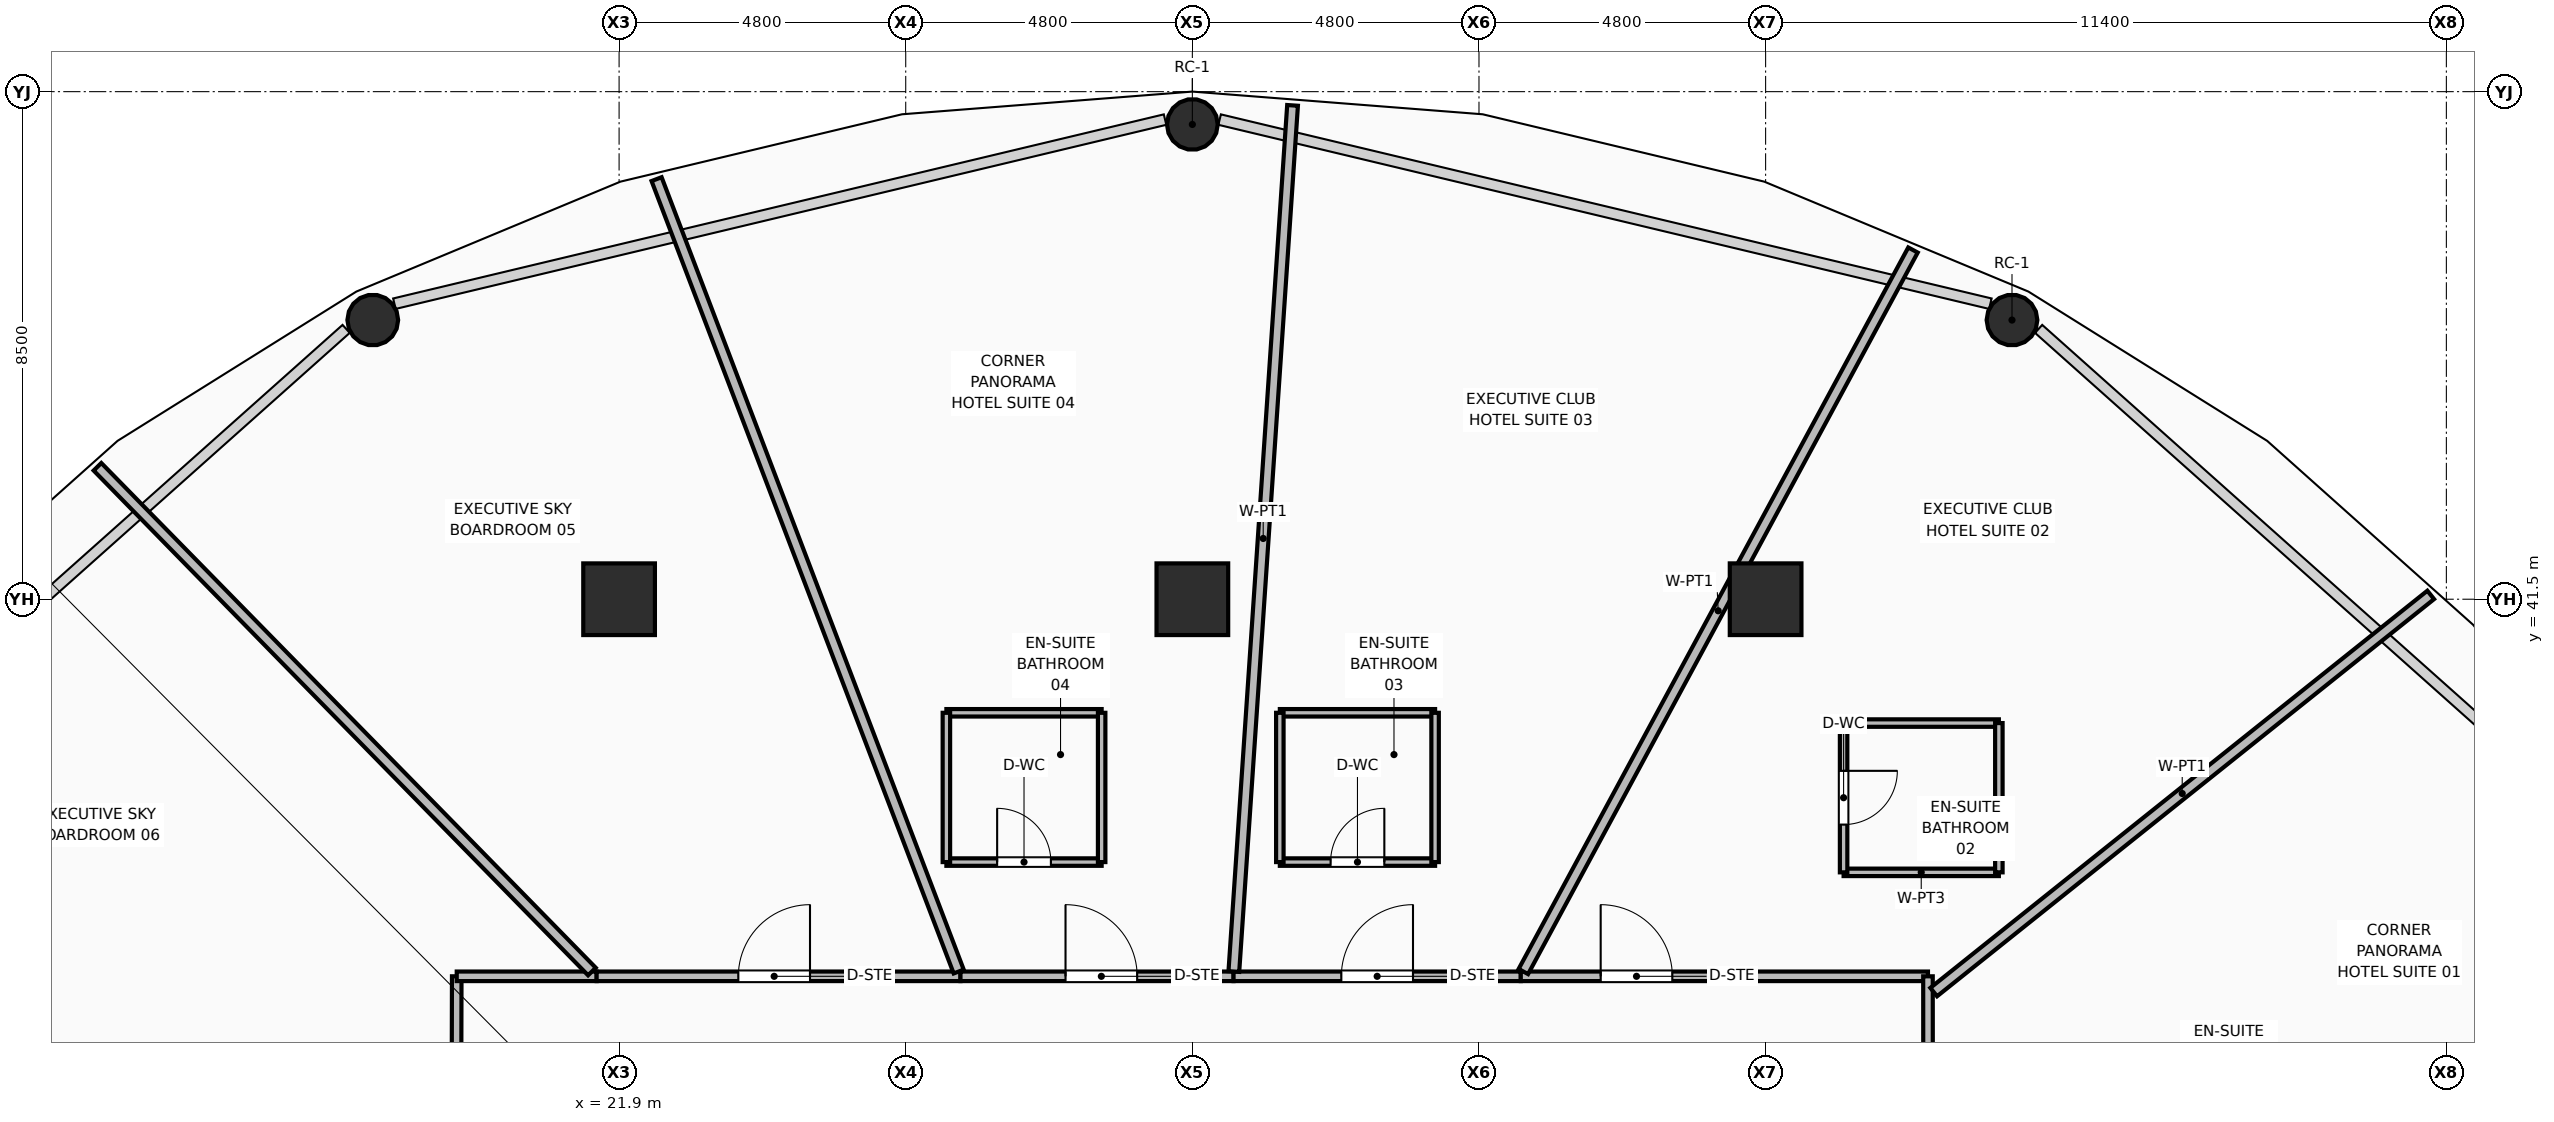
"""IFC4 building model, lengths in metres.
Left out: names, types, materials, properties, quantities, classifications, styles, units other than length and angle.
Written with IfcOpenShell. Run it as: python <this file> out.ifc"""

import sys

from ifc_helpers import new_model, si_unit, direction, frame, frame_2d, origin, origin_2d, place, context, subcontext, project, spatial, rectangle, hollow_rectangle, hollow_circle, extrude, element, fill, save


model = new_model("IFC4")
c1 = context("Model", 3, precision=1e-05, world=origin(), true_north=direction((0.0, 1.0)))
c2 = subcontext(c1, "Body", "Model", "MODEL_VIEW")
j1 = project(units=[si_unit("LENGTHUNIT", "METRE"), si_unit("PLANEANGLEUNIT", "RADIAN")], contexts=[c1])
p1 = place(None, origin())
s1 = spatial("IfcSite", under=j1, at=p1, CompositionType="ELEMENT")
p2 = place(p1, origin())
s2 = spatial("IfcBuilding", under=s1, at=p2, CompositionType="ELEMENT")
p3 = place(p2, frame((0.0, 0.0, 60.75)))
s3 = spatial("IfcBuildingStorey", under=s2, at=p3, CompositionType="ELEMENT", Elevation=60.75)
for number, where, z_axis, x_axis in (
    (1, (21.9, 41.5, 0.0), (0.0, 0.0, 1.0), (1.0, 0.0, 0.0)),
    (2, (31.5, 41.5, 0.0), (0.0, 0.0, 1.0), (1.0, 0.0, 0.0)),
    (3, (41.1, 41.5, 0.0), (0.0, 0.0, 1.0), (1.0, 0.0, 0.0)),
):
    element("IfcColumn", number, at=place(p3, frame(where, z_axis=z_axis, x_axis=x_axis)), inside=s3, PredefinedType="COLUMN", context=c2, shape_type="SweptSolid", body=[
        extrude(hollow_rectangle(XDim=1.2, YDim=1.2, WallThickness=0.045, at=origin_2d()), origin(), (0.0, 0.0, 1.0), 3.75),
    ])
for number, where, z_axis, x_axis in (
    (4, (45.226, 46.175, 0.0), (0.0, 0.0, 1.0), (1.0, 0.0, 0.0)),
    (5, (31.5, 49.451, 0.0), (0.0, 0.0, 1.0), (1.0, 0.0, 0.0)),
    (6, (17.775, 46.175, 0.0), (0.0, 0.0, 1.0), (1.0, 0.0, 0.0)),
):
    element("IfcColumn", number, at=place(p3, frame(where, z_axis=z_axis, x_axis=x_axis)), inside=s3, PredefinedType="COLUMN", context=c2, shape_type="SweptSolid", body=[
        extrude(hollow_circle(Radius=0.425, WallThickness=0.04, at=origin_2d()), origin(), (0.0, 0.0, 1.0), 3.57),
    ])
p4 = place(p3, frame((19.17, 30.432, 0.0), z_axis=(0.0, 0.0, 1.0), x_axis=(0.002311360614, 0.999997328802, 0.0)))
e7 = element("IfcWall", 7, at=p4, inside=s3, PredefinedType="PARTITIONING", context=c2, shape_type="SweptSolid", body=[
    extrude(rectangle(XDim=4.753, YDim=0.16, at=frame_2d((2.376, 0.0))), origin(), (0.0, 0.0, 1.0), 2.928),
])
p5 = place(p4, frame((0.601, 0.0, 0.0)))
e8 = element("IfcOpeningElement", 8, at=p5, cuts=e7, PredefinedType="OPENING", context=c2, shape_type="SweptSolid", body=[
    extrude(rectangle(XDim=1.2, YDim=2.1, at=frame_2d((0.6, 1.05))), frame((0.0, 0.09, 0.0), z_axis=(0.0, -1.0, 0.0), x_axis=(1.0, 0.0, 0.0)), (0.0, 0.0, 1.0), 0.18),
])
p6 = place(p3, frame((19.181, 35.185, 0.0), z_axis=(0.0, 0.0, 1.0), x_axis=(1.0, 0.0, 0.0)))
e9 = element("IfcWall", 9, at=p6, inside=s3, PredefinedType="PARTITIONING", context=c2, shape_type="SweptSolid", body=[
    extrude(rectangle(XDim=2.343, YDim=0.16, at=frame_2d((1.171, 0.0))), origin(), (0.0, 0.0, 1.0), 2.928),
])
p7 = place(p3, frame((21.524, 35.185, 0.0), z_axis=(0.0, 0.0, 1.0), x_axis=(1.0, 0.0, 0.0)))
e10 = element("IfcWall", 10, at=p7, inside=s3, PredefinedType="PARTITIONING", context=c2, shape_type="SweptSolid", body=[
    extrude(rectangle(XDim=6.093, YDim=0.16, at=frame_2d((3.046, 0.0))), origin(), (0.0, 0.0, 1.0), 3.55),
])
p8 = place(p7, frame((2.373, 0.0, 0.0)))
e11 = element("IfcOpeningElement", 11, at=p8, cuts=e10, PredefinedType="OPENING", context=c2, shape_type="SweptSolid", body=[
    extrude(rectangle(XDim=1.2, YDim=2.1, at=frame_2d((0.6, 1.05))), frame((0.0, 0.09, 0.0), z_axis=(0.0, -1.0, 0.0), x_axis=(1.0, 0.0, 0.0)), (0.0, 0.0, 1.0), 0.18),
])
p9 = place(p3, frame((27.617, 35.185, 0.0), z_axis=(0.0, 0.0, 1.0), x_axis=(1.0, 0.0, 0.0)))
e12 = element("IfcWall", 12, at=p9, inside=s3, PredefinedType="PARTITIONING", context=c2, shape_type="SweptSolid", body=[
    extrude(rectangle(XDim=4.573, YDim=0.16, at=frame_2d((2.287, 0.0))), origin(), (0.0, 0.0, 1.0), 2.928),
])
p10 = place(p9, frame((1.759, 0.0, 0.0)))
e13 = element("IfcOpeningElement", 13, at=p10, cuts=e12, PredefinedType="OPENING", context=c2, shape_type="SweptSolid", body=[
    extrude(rectangle(XDim=1.2, YDim=2.1, at=frame_2d((0.6, 1.05))), frame((0.0, 0.09, 0.0), z_axis=(0.0, -1.0, 0.0), x_axis=(1.0, 0.0, 0.0)), (0.0, 0.0, 1.0), 0.18),
])
p11 = place(p3, frame((32.19, 35.185, 0.0), z_axis=(0.0, 0.0, 1.0), x_axis=(1.0, 0.0, 0.0)))
e14 = element("IfcWall", 14, at=p11, inside=s3, PredefinedType="PARTITIONING", context=c2, shape_type="SweptSolid", body=[
    extrude(rectangle(XDim=4.81, YDim=0.16, at=frame_2d((2.405, 0.0))), origin(), (0.0, 0.0, 1.0), 3.55),
])
p12 = place(p11, frame((1.805, 0.0, 0.0)))
e15 = element("IfcOpeningElement", 15, at=p12, cuts=e14, PredefinedType="OPENING", context=c2, shape_type="SweptSolid", body=[
    extrude(rectangle(XDim=1.2, YDim=2.1, at=frame_2d((0.6, 1.05))), frame((0.0, 0.09, 0.0), z_axis=(0.0, -1.0, 0.0), x_axis=(1.0, 0.0, 0.0)), (0.0, 0.0, 1.0), 0.18),
])
p13 = place(p3, frame((37.0, 35.185, 0.0), z_axis=(0.0, 0.0, 1.0), x_axis=(1.0, 0.0, 0.0)))
e16 = element("IfcWall", 16, at=p13, inside=s3, PredefinedType="PARTITIONING", context=c2, shape_type="SweptSolid", body=[
    extrude(rectangle(XDim=6.819, YDim=0.16, at=frame_2d((3.41, 0.0))), origin(), (0.0, 0.0, 1.0), 2.928),
])
p14 = place(p13, frame((1.338, 0.0, 0.0)))
e17 = element("IfcOpeningElement", 17, at=p14, cuts=e16, PredefinedType="OPENING", context=c2, shape_type="SweptSolid", body=[
    extrude(rectangle(XDim=1.2, YDim=2.1, at=frame_2d((0.6, 1.05))), frame((0.0, 0.09, 0.0), z_axis=(0.0, -1.0, 0.0), x_axis=(1.0, 0.0, 0.0)), (0.0, 0.0, 1.0), 0.18),
])
p15 = place(p3, frame((43.819, 35.185, 0.0), z_axis=(0.0, 0.0, 1.0), x_axis=(0.000614958758, -0.999999810913, 0.0)))
e18 = element("IfcWall", 18, at=p15, inside=s3, PredefinedType="PARTITIONING", context=c2, shape_type="SweptSolid", body=[
    extrude(rectangle(XDim=6.352, YDim=0.16, at=frame_2d((3.176, 0.0))), origin(), (0.0, 0.0, 1.0), 2.928),
])
p16 = place(p15, frame((4.553, 0.0, 0.0)))
e19 = element("IfcOpeningElement", 19, at=p16, cuts=e18, PredefinedType="OPENING", context=c2, shape_type="SweptSolid", body=[
    extrude(rectangle(XDim=1.2, YDim=2.1, at=frame_2d((0.6, 1.05))), frame((0.0, 0.09, 0.0), z_axis=(0.0, -1.0, 0.0), x_axis=(1.0, 0.0, 0.0)), (0.0, 0.0, 1.0), 0.18),
])
p17 = place(p3, frame((43.915, 34.921, 0.0), z_axis=(0.0, 0.0, 1.0), x_axis=(0.781201807071, 0.624278572938, 0.0)))
e20 = element("IfcWall", 20, at=p17, inside=s3, PredefinedType="PARTITIONING", context=c2, shape_type="SweptSolid", body=[
    extrude(rectangle(XDim=10.654, YDim=0.18, at=frame_2d((5.327, 0.0))), origin(), (0.0, 0.0, 1.0), 2.775),
])
p18 = place(p3, frame((37.043, 35.265, 0.0), z_axis=(0.0, 0.0, 1.0), x_axis=(0.475167084094, 0.879895585961, 0.0)))
e21 = element("IfcWall", 21, at=p18, inside=s3, PredefinedType="PARTITIONING", context=c2, shape_type="SweptSolid", body=[
    extrude(rectangle(XDim=13.732, YDim=0.18, at=frame_2d((6.866, 0.0))), origin(), (0.0, 0.0, 1.0), 2.775),
])
p19 = place(p3, frame((32.195, 35.265, 0.0), z_axis=(0.0, 0.0, 1.0), x_axis=(0.06760790372, 0.997711968132, 0.0)))
e22 = element("IfcWall", 22, at=p19, inside=s3, PredefinedType="PARTITIONING", context=c2, shape_type="SweptSolid", body=[
    extrude(rectangle(XDim=14.538, YDim=0.18, at=frame_2d((7.269, 0.0))), origin(), (0.0, 0.0, 1.0), 2.775),
])
p20 = place(p3, frame((27.587, 35.265, 0.0), z_axis=(0.0, 0.0, 1.0), x_axis=(-0.356216214418, 0.93440355767, 0.0)))
e23 = element("IfcWall", 23, at=p20, inside=s3, PredefinedType="PARTITIONING", context=c2, shape_type="SweptSolid", body=[
    extrude(rectangle(XDim=14.202, YDim=0.18, at=frame_2d((7.101, 0.0))), origin(), (0.0, 0.0, 1.0), 2.775),
])
p21 = place(p3, frame((21.445, 35.265, 0.0), z_axis=(0.0, 0.0, 1.0), x_axis=(-0.699754693744, 0.714383208498, 0.0)))
e24 = element("IfcWall", 24, at=p21, inside=s3, PredefinedType="PARTITIONING", context=c2, shape_type="SweptSolid", body=[
    extrude(rectangle(XDim=11.833, YDim=0.18, at=frame_2d((5.917, 0.0))), origin(), (0.0, 0.0, 1.0), 2.775),
])
p22 = place(p3, frame((19.085, 30.469, 0.0), z_axis=(0.0, 0.0, 1.0), x_axis=(-0.915142788341, 0.403129851223, 0.0)))
e25 = element("IfcWall", 25, at=p22, inside=s3, PredefinedType="PARTITIONING", context=c2, shape_type="SweptSolid", body=[
    extrude(rectangle(XDim=13.675, YDim=0.18, at=frame_2d((6.838, 0.0))), origin(), (0.0, 0.0, 1.0), 2.775),
])
for number, where, z_axis, x_axis in (
    (26, (42.406, 36.926, 0.0), (0.0, 0.0, 1.0), (1.0, 0.0, 0.0)),
    (27, (42.406, 39.426, 0.0), (0.0, 0.0, 1.0), (1.0, 0.0, 0.0)),
):
    element("IfcWall", number, at=place(p3, frame(where, z_axis=z_axis, x_axis=x_axis)), inside=s3, PredefinedType="PARTITIONING", context=c2, shape_type="SweptSolid", body=[
        extrude(rectangle(XDim=2.6, YDim=0.125, at=frame_2d((1.3, 0.0))), origin(), (0.0, 0.0, 1.0), 2.928),
    ])
p23 = place(p3, frame((42.406, 36.926, 0.0), z_axis=(0.0, 0.0, 1.0), x_axis=(0.0, 1.0, 0.0)))
e28 = element("IfcWall", 28, at=p23, inside=s3, PredefinedType="PARTITIONING", context=c2, shape_type="SweptSolid", body=[
    extrude(rectangle(XDim=2.5, YDim=0.125, at=frame_2d((1.25, 0.0))), origin(), (0.0, 0.0, 1.0), 2.928),
])
p24 = place(p23, frame((0.8, 0.0, 0.0)))
e29 = element("IfcOpeningElement", 29, at=p24, cuts=e28, PredefinedType="OPENING", context=c2, shape_type="SweptSolid", body=[
    extrude(rectangle(XDim=0.9, YDim=2.1, at=frame_2d((0.45, 1.05))), frame((0.0, 0.073, 0.0), z_axis=(0.0, -1.0, 0.0), x_axis=(1.0, 0.0, 0.0)), (0.0, 0.0, 1.0), 0.145),
])
p25 = place(p3, frame((45.006, 36.926, 0.0), z_axis=(0.0, 0.0, 1.0), x_axis=(0.0, 1.0, 0.0)))
e30 = element("IfcWall", 30, at=p25, inside=s3, PredefinedType="PARTITIONING", context=c2, shape_type="SweptSolid", body=[
    extrude(rectangle(XDim=2.5, YDim=0.125, at=frame_2d((1.25, 0.0))), origin(), (0.0, 0.0, 1.0), 3.55),
])
p26 = place(p3, frame((32.965, 37.098, 0.0), z_axis=(0.0, 0.0, 1.0), x_axis=(1.0, 0.0, 0.0)))
e31 = element("IfcWall", 31, at=p26, inside=s3, PredefinedType="PARTITIONING", context=c2, shape_type="SweptSolid", body=[
    extrude(rectangle(XDim=2.6, YDim=0.125, at=frame_2d((1.3, 0.0))), origin(), (0.0, 0.0, 1.0), 3.55),
])
p27 = place(p26, frame((0.85, 0.0, 0.0)))
e32 = element("IfcOpeningElement", 32, at=p27, cuts=e31, PredefinedType="OPENING", context=c2, shape_type="SweptSolid", body=[
    extrude(rectangle(XDim=0.9, YDim=2.1, at=frame_2d((0.45, 1.05))), frame((0.0, 0.073, 0.0), z_axis=(0.0, -1.0, 0.0), x_axis=(1.0, 0.0, 0.0)), (0.0, 0.0, 1.0), 0.145),
])
p28 = place(p3, frame((32.965, 39.598, 0.0), z_axis=(0.0, 0.0, 1.0), x_axis=(1.0, 0.0, 0.0)))
e33 = element("IfcWall", 33, at=p28, inside=s3, PredefinedType="PARTITIONING", context=c2, shape_type="SweptSolid", body=[
    extrude(rectangle(XDim=2.6, YDim=0.125, at=frame_2d((1.3, 0.0))), origin(), (0.0, 0.0, 1.0), 3.55),
])
for number, where, z_axis, x_axis in (
    (34, (32.965, 37.098, 0.0), (0.0, 0.0, 1.0), (0.0, 1.0, 0.0)),
    (35, (35.565, 37.098, 0.0), (0.0, 0.0, 1.0), (0.0, 1.0, 0.0)),
):
    element("IfcWall", number, at=place(p3, frame(where, z_axis=z_axis, x_axis=x_axis)), inside=s3, PredefinedType="PARTITIONING", context=c2, shape_type="SweptSolid", body=[
        extrude(rectangle(XDim=2.5, YDim=0.125, at=frame_2d((1.25, 0.0))), origin(), (0.0, 0.0, 1.0), 3.55),
    ])
p29 = place(p3, frame((27.381, 37.098, 0.0), z_axis=(0.0, 0.0, 1.0), x_axis=(1.0, 0.0, 0.0)))
e36 = element("IfcWall", 36, at=p29, inside=s3, PredefinedType="PARTITIONING", context=c2, shape_type="SweptSolid", body=[
    extrude(rectangle(XDim=2.6, YDim=0.125, at=frame_2d((1.3, 0.0))), origin(), (0.0, 0.0, 1.0), 3.55),
])
p30 = place(p29, frame((0.85, 0.0, 0.0)))
e37 = element("IfcOpeningElement", 37, at=p30, cuts=e36, PredefinedType="OPENING", context=c2, shape_type="SweptSolid", body=[
    extrude(rectangle(XDim=0.9, YDim=2.1, at=frame_2d((0.45, 1.05))), frame((0.0, 0.073, 0.0), z_axis=(0.0, -1.0, 0.0), x_axis=(1.0, 0.0, 0.0)), (0.0, 0.0, 1.0), 0.145),
])
p31 = place(p3, frame((27.381, 39.598, 0.0), z_axis=(0.0, 0.0, 1.0), x_axis=(1.0, 0.0, 0.0)))
e38 = element("IfcWall", 38, at=p31, inside=s3, PredefinedType="PARTITIONING", context=c2, shape_type="SweptSolid", body=[
    extrude(rectangle(XDim=2.6, YDim=0.125, at=frame_2d((1.3, 0.0))), origin(), (0.0, 0.0, 1.0), 3.55),
])
for number, where, z_axis, x_axis in (
    (39, (27.381, 37.098, 0.0), (0.0, 0.0, 1.0), (0.0, 1.0, 0.0)),
    (40, (29.981, 37.098, 0.0), (0.0, 0.0, 1.0), (0.0, 1.0, 0.0)),
):
    element("IfcWall", number, at=place(p3, frame(where, z_axis=z_axis, x_axis=x_axis)), inside=s3, PredefinedType="PARTITIONING", context=c2, shape_type="SweptSolid", body=[
        extrude(rectangle(XDim=2.5, YDim=0.125, at=frame_2d((1.25, 0.0))), origin(), (0.0, 0.0, 1.0), 3.55),
    ])
p32 = place(p24, frame((0.9, 0.0, 0.0), z_axis=(0.0, 0.0, 1.0), x_axis=(-1.0, 0.0, 0.0)))
e41 = element("IfcDoor", 41, at=p32, inside=s3, OperationType="SINGLE_SWING_LEFT", PredefinedType="DOOR", context=c2, shape_type="SweptSolid", body=[
    extrude(rectangle(XDim=0.9, YDim=2.1, at=frame_2d((0.45, 1.05))), frame((0.0, 0.025, 0.0), z_axis=(0.0, -1.0, 0.0), x_axis=(1.0, 0.0, 0.0)), (0.0, 0.0, 1.0), 0.05),
])
fill(e29, e41)
p33 = place(p14, origin())
e42 = element("IfcDoor", 42, at=p33, inside=s3, OperationType="SINGLE_SWING_LEFT", PredefinedType="DOOR", context=c2, shape_type="SweptSolid", body=[
    extrude(rectangle(XDim=1.2, YDim=2.1, at=frame_2d((0.6, 1.05))), frame((0.0, 0.025, 0.0), z_axis=(0.0, -1.0, 0.0), x_axis=(1.0, 0.0, 0.0)), (0.0, 0.0, 1.0), 0.05),
])
fill(e17, e42)
p34 = place(p27, origin())
e43 = element("IfcDoor", 43, at=p34, inside=s3, OperationType="SINGLE_SWING_RIGHT", PredefinedType="DOOR", context=c2, shape_type="SweptSolid", body=[
    extrude(rectangle(XDim=0.9, YDim=2.1, at=frame_2d((0.45, 1.05))), frame((0.0, 0.025, 0.0), z_axis=(0.0, -1.0, 0.0), x_axis=(1.0, 0.0, 0.0)), (0.0, 0.0, 1.0), 0.05),
])
fill(e32, e43)
p35 = place(p12, origin())
e44 = element("IfcDoor", 44, at=p35, inside=s3, OperationType="SINGLE_SWING_RIGHT", PredefinedType="DOOR", context=c2, shape_type="SweptSolid", body=[
    extrude(rectangle(XDim=1.2, YDim=2.1, at=frame_2d((0.6, 1.05))), frame((0.0, 0.025, 0.0), z_axis=(0.0, -1.0, 0.0), x_axis=(1.0, 0.0, 0.0)), (0.0, 0.0, 1.0), 0.05),
])
fill(e15, e44)
p36 = place(p30, origin())
e45 = element("IfcDoor", 45, at=p36, inside=s3, OperationType="SINGLE_SWING_LEFT", PredefinedType="DOOR", context=c2, shape_type="SweptSolid", body=[
    extrude(rectangle(XDim=0.9, YDim=2.1, at=frame_2d((0.45, 1.05))), frame((0.0, 0.025, 0.0), z_axis=(0.0, -1.0, 0.0), x_axis=(1.0, 0.0, 0.0)), (0.0, 0.0, 1.0), 0.05),
])
fill(e37, e45)
p37 = place(p10, origin())
e46 = element("IfcDoor", 46, at=p37, inside=s3, OperationType="SINGLE_SWING_LEFT", PredefinedType="DOOR", context=c2, shape_type="SweptSolid", body=[
    extrude(rectangle(XDim=1.2, YDim=2.1, at=frame_2d((0.6, 1.05))), frame((0.0, 0.025, 0.0), z_axis=(0.0, -1.0, 0.0), x_axis=(1.0, 0.0, 0.0)), (0.0, 0.0, 1.0), 0.05),
])
fill(e13, e46)
p38 = place(p8, origin())
e47 = element("IfcDoor", 47, at=p38, inside=s3, OperationType="SINGLE_SWING_RIGHT", PredefinedType="DOOR", context=c2, shape_type="SweptSolid", body=[
    extrude(rectangle(XDim=1.2, YDim=2.1, at=frame_2d((0.6, 1.05))), frame((0.0, 0.025, 0.0), z_axis=(0.0, -1.0, 0.0), x_axis=(1.0, 0.0, 0.0)), (0.0, 0.0, 1.0), 0.05),
])
fill(e11, e47)
save(model, sys.argv[1])
